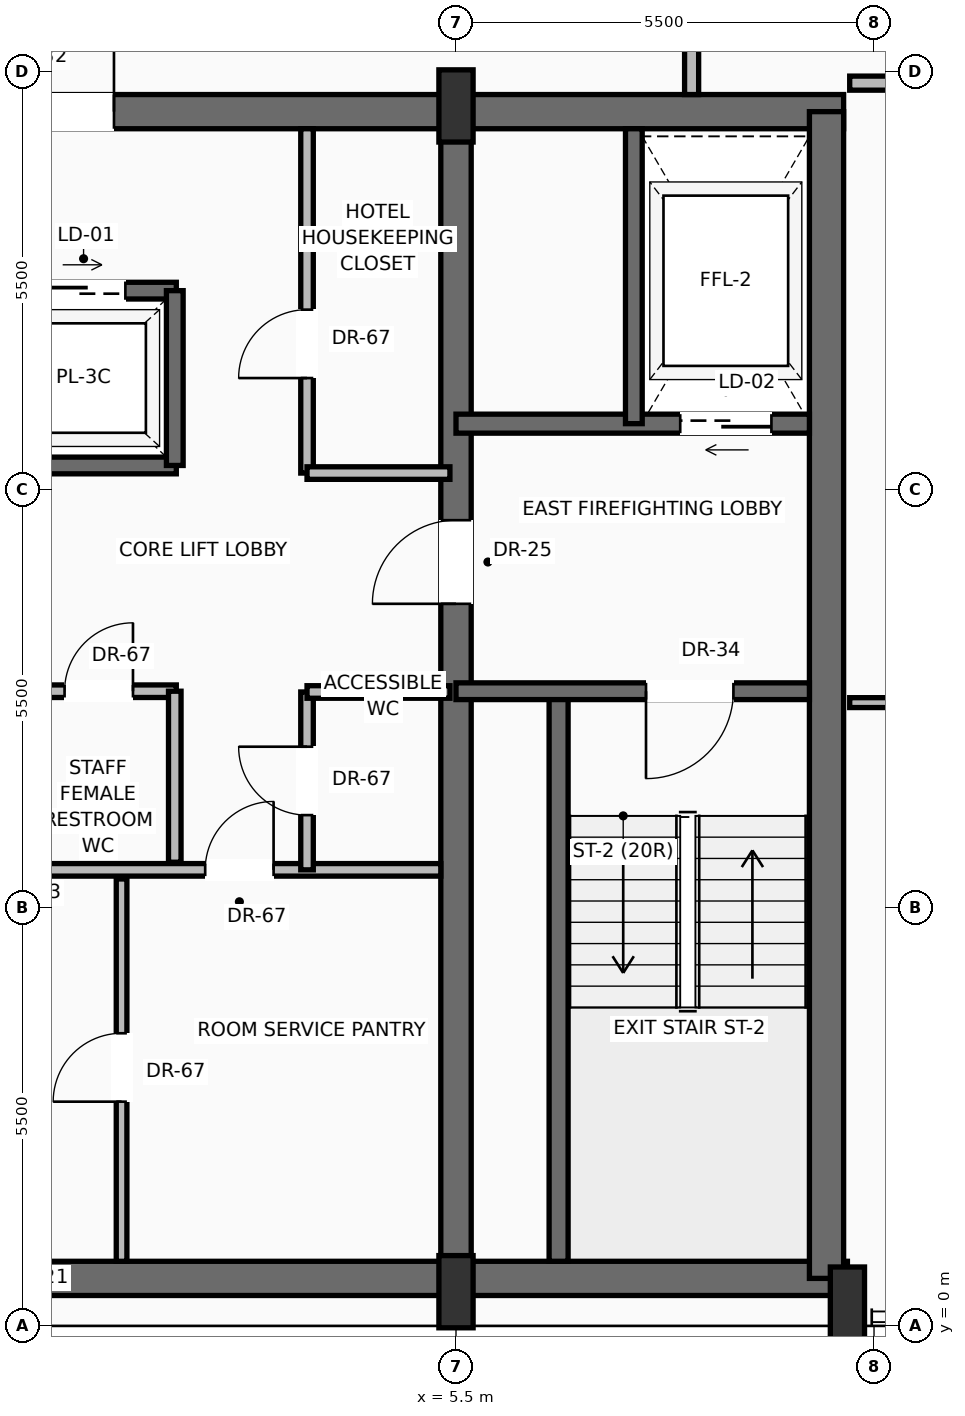
"""IFC4 building model, lengths in metres.
Left out: names, types, materials, properties, quantities, classifications, styles, units other than length and angle.
Written with IfcOpenShell. Run it as: python <this file> out.ifc"""

import sys

from ifc_helpers import new_model, si_unit, direction, frame, frame_2d, origin, origin_2d, place, context, subcontext, project, spatial, rectangle, extrude, source, transform, mapped, element, fill, save


model = new_model("IFC4")
c1 = context("Model", 3, precision=1e-05, world=origin(), true_north=direction((0.0, 1.0)))
c2 = subcontext(c1, "Body", "Model", "MODEL_VIEW")
j1 = project(units=[si_unit("LENGTHUNIT", "METRE"), si_unit("PLANEANGLEUNIT", "RADIAN")], contexts=[c1])
p1 = place(None, origin())
s1 = spatial("IfcSite", under=j1, at=p1, CompositionType="ELEMENT")
p2 = place(p1, origin())
s2 = spatial("IfcBuilding", under=s1, at=p2, CompositionType="ELEMENT")
p3 = place(p2, frame((0.0, 0.0, 279.9)))
s3 = spatial("IfcBuildingStorey", under=s2, at=p3, CompositionType="ELEMENT", Elevation=279.9)
p4 = place(p3, frame((-10.65, 0.625, 0.0), z_axis=(0.0, 0.0, 1.0), x_axis=(1.0, 0.0, 0.0)))
e1 = element("IfcWall", 1, at=p4, inside=s3, PredefinedType="SHEAR", context=c2, shape_type="SweptSolid", body=[
    extrude(rectangle(XDim=21.3, YDim=0.45, at=frame_2d((10.65, 0.0))), origin(), (0.0, 0.0, 1.0), 3.24),
])
p5 = place(p3, frame((-10.6, 15.975, 0.0), z_axis=(0.0, 0.0, 1.0), x_axis=(1.0, 0.0, 0.0)))
e2 = element("IfcWall", 2, at=p5, inside=s3, PredefinedType="SHEAR", context=c2, shape_type="SweptSolid", body=[
    extrude(rectangle(XDim=21.2, YDim=0.45, at=frame_2d((10.6, 0.0))), origin(), (0.0, 0.0, 1.0), 3.24),
])
p6 = place(p5, frame((3.17, 0.0, 0.0)))
e3 = element("IfcOpeningElement", 3, at=p6, cuts=e2, PredefinedType="OPENING", context=c2, shape_type="SweptSolid", body=[
    extrude(rectangle(XDim=1.3, YDim=2.3, at=frame_2d((0.65, 1.15))), frame((0.0, 0.235, 0.0), z_axis=(0.0, -1.0, 0.0), x_axis=(1.0, 0.0, 0.0)), (0.0, 0.0, 1.0), 0.47),
])
p7 = place(p5, frame((9.6, 0.0, 0.0)))
e4 = element("IfcOpeningElement", 4, at=p7, cuts=e2, PredefinedType="OPENING", context=c2, shape_type="SweptSolid", body=[
    extrude(rectangle(XDim=2.0, YDim=2.4, at=frame_2d((1.0, 1.2))), frame((0.0, 0.235, 0.0), z_axis=(0.0, -1.0, 0.0), x_axis=(1.0, 0.0, 0.0)), (0.0, 0.0, 1.0), 0.47),
])
p8 = place(p3, frame((10.375, 0.625, 0.0), z_axis=(0.0, 0.0, 1.0), x_axis=(0.0, 1.0, 0.0)))
e5 = element("IfcWall", 5, at=p8, inside=s3, PredefinedType="SHEAR", context=c2, shape_type="SweptSolid", body=[
    extrude(rectangle(XDim=15.35, YDim=0.45, at=frame_2d((7.675, 0.0))), origin(), (0.0, 0.0, 1.0), 3.24),
])
p9 = place(p3, frame((5.5, 0.625, 0.0), z_axis=(0.0, 0.0, 1.0), x_axis=(0.0, 1.0, 0.0)))
e6 = element("IfcWall", 6, at=p9, inside=s3, PredefinedType="SHEAR", context=c2, shape_type="SweptSolid", body=[
    extrude(rectangle(XDim=15.35, YDim=0.4, at=frame_2d((7.675, 0.0))), origin(), (0.0, 0.0, 1.0), 3.24),
])
p10 = place(p9, frame((8.875, 0.0, 0.0)))
e7 = element("IfcOpeningElement", 7, at=p10, cuts=e6, PredefinedType="OPENING", context=c2, shape_type="SweptSolid", body=[
    extrude(rectangle(XDim=1.1, YDim=2.2, at=frame_2d((0.55, 1.1))), frame((0.0, 0.21, 0.0), z_axis=(0.0, -1.0, 0.0), x_axis=(1.0, 0.0, 0.0)), (0.0, 0.0, 1.0), 0.42),
])
m1 = source(origin(), c2, "Body", "SweptSolid", [
    extrude(rectangle(XDim=0.45, YDim=0.95, at=origin_2d()), origin(), (0.0, 0.0, 1.0), 3.45),
])
for number, where, z_axis, x_axis in (
    (8, (5.5, 0.45, 0.0), (0.0, 0.0, 1.0), (1.0, 0.0, 0.0)),
    (9, (10.65, 0.3, 0.0), (0.0, 0.0, 1.0), (1.0, 0.0, 0.0)),
    (10, (5.5, 16.05, 0.0), (0.0, 0.0, 1.0), (1.0, 0.0, 0.0)),
):
    element("IfcColumn", number, at=place(p3, frame(where, z_axis=z_axis, x_axis=x_axis)), inside=s3, PredefinedType="PILASTER", context=c2, shape_type="MappedRepresentation", body=[
        mapped(m1, transform((0.0, 0.0, 0.0), scale=1.0)),
    ])
p11 = place(p3, frame((7.796, 31.717, 0.0), z_axis=(0.0, 0.0, 1.0), x_axis=(0.507930566701, -0.861398014515, 0.0)))
e11 = element("IfcWall", 11, at=p11, inside=s3, PredefinedType="SOLIDWALL", context=c2, shape_type="SweptSolid", body=[
    extrude(rectangle(XDim=20.045, YDim=0.28, at=frame_2d((10.022, 0.0))), origin(), (0.0, 0.0, 1.0), 2.82),
])
p12 = place(p11, frame((4.811, 0.0, 0.0)))
e12 = element("IfcOpeningElement", 12, at=p12, cuts=e11, PredefinedType="OPENING", context=c2, shape_type="SweptSolid", body=[
    extrude(rectangle(XDim=1.6, YDim=2.35, at=frame_2d((0.8, 1.175))), frame((0.0, 0.15, 0.0), z_axis=(0.0, -1.0, 0.0), x_axis=(1.0, 0.0, 0.0)), (0.0, 0.0, 1.0), 0.3),
])
p13 = place(p11, frame((13.63, 0.0, 0.9)))
e13 = element("IfcOpeningElement", 13, at=p13, cuts=e11, PredefinedType="OPENING", context=c2, shape_type="SweptSolid", body=[
    extrude(rectangle(XDim=1.55, YDim=1.75, at=frame_2d((0.775, 0.875))), frame((0.0, 0.15, 0.0), z_axis=(0.0, -1.0, 0.0), x_axis=(1.0, 0.0, 0.0)), (0.0, 0.0, 1.0), 0.3),
])
p14 = place(p3, frame((6.85, 0.85, 0.0), z_axis=(0.0, 0.0, 1.0), x_axis=(0.0, 1.0, 0.0)))
e14 = element("IfcWall", 14, at=p14, inside=s3, PredefinedType="SOLIDWALL", context=c2, shape_type="SweptSolid", body=[
    extrude(rectangle(XDim=7.5, YDim=0.25, at=frame_2d((3.75, 0.0))), origin(), (0.0, 0.0, 1.0), 3.24),
])
p15 = place(p3, frame((10.15, 8.35, 0.0), z_axis=(0.0, 0.0, 1.0), x_axis=(-1.0, 0.0, 0.0)))
e15 = element("IfcWall", 15, at=p15, inside=s3, PredefinedType="SOLIDWALL", context=c2, shape_type="SweptSolid", body=[
    extrude(rectangle(XDim=4.65, YDim=0.22, at=frame_2d((2.325, 0.0))), origin(), (0.0, 0.0, 1.0), 3.24),
])
p16 = place(p15, frame((1.0, 0.0, 0.0)))
e16 = element("IfcOpeningElement", 16, at=p16, cuts=e15, PredefinedType="OPENING", context=c2, shape_type="SweptSolid", body=[
    extrude(rectangle(XDim=1.15, YDim=2.2, at=frame_2d((0.575, 1.1))), frame((0.0, 0.12, 0.0), z_axis=(0.0, -1.0, 0.0), x_axis=(1.0, 0.0, 0.0)), (0.0, 0.0, 1.0), 0.24),
])
p17 = place(p3, frame((10.15, 11.87, 0.0), z_axis=(0.0, 0.0, 1.0), x_axis=(-1.0, 0.0, 0.0)))
e17 = element("IfcWall", 17, at=p17, inside=s3, PredefinedType="SOLIDWALL", context=c2, shape_type="SweptSolid", body=[
    extrude(rectangle(XDim=4.65, YDim=0.25, at=frame_2d((2.325, 0.0))), origin(), (0.0, 0.0, 1.0), 3.24),
])
p18 = place(p17, frame((0.5, 0.0, 0.0)))
e18 = element("IfcOpeningElement", 18, at=p18, cuts=e17, PredefinedType="OPENING", context=c2, shape_type="SweptSolid", body=[
    extrude(rectangle(XDim=1.2, YDim=2.25, at=frame_2d((0.6, 1.125))), frame((0.0, 0.135, 0.0), z_axis=(0.0, -1.0, 0.0), x_axis=(1.0, 0.0, 0.0)), (0.0, 0.0, 1.0), 0.27),
])
p19 = place(p3, frame((7.84, 11.87, 0.0), z_axis=(0.0, 0.0, 1.0), x_axis=(0.0, 1.0, 0.0)))
e19 = element("IfcWall", 19, at=p19, inside=s3, PredefinedType="SOLIDWALL", context=c2, shape_type="SweptSolid", body=[
    extrude(rectangle(XDim=3.88, YDim=0.22, at=frame_2d((1.94, 0.0))), origin(), (0.0, 0.0, 1.0), 3.24),
])
p20 = place(p3, frame((-5.5, 6.0, 0.0), z_axis=(0.0, 0.0, 1.0), x_axis=(1.0, 0.0, 0.0)))
e20 = element("IfcWall", 20, at=p20, inside=s3, PredefinedType="PARTITIONING", context=c2, shape_type="SweptSolid", body=[
    extrude(rectangle(XDim=10.8, YDim=0.165, at=frame_2d((5.4, 0.0))), origin(), (0.0, 0.0, 1.0), 3.232),
])
p21 = place(p20, frame((7.7, 0.0, 0.0)))
e21 = element("IfcOpeningElement", 21, at=p21, cuts=e20, PredefinedType="OPENING", context=c2, shape_type="SweptSolid", body=[
    extrude(rectangle(XDim=0.9, YDim=2.1, at=frame_2d((0.45, 1.05))), frame((0.0, 0.093, 0.0), z_axis=(0.0, -1.0, 0.0), x_axis=(1.0, 0.0, 0.0)), (0.0, 0.0, 1.0), 0.185),
])
p22 = place(p3, frame((1.1, 0.85, 0.0), z_axis=(0.0, 0.0, 1.0), x_axis=(0.0, 1.0, 0.0)))
e22 = element("IfcWall", 22, at=p22, inside=s3, PredefinedType="PARTITIONING", context=c2, shape_type="SweptSolid", body=[
    extrude(rectangle(XDim=5.03, YDim=0.14, at=frame_2d((2.515, 0.0))), origin(), (0.0, 0.0, 1.0), 3.232),
])
p23 = place(p22, frame((2.1, 0.0, 0.0)))
e23 = element("IfcOpeningElement", 23, at=p23, cuts=e22, PredefinedType="OPENING", context=c2, shape_type="SweptSolid", body=[
    extrude(rectangle(XDim=0.9, YDim=2.1, at=frame_2d((0.45, 1.05))), frame((0.0, 0.08, 0.0), z_axis=(0.0, -1.0, 0.0), x_axis=(1.0, 0.0, 0.0)), (0.0, 0.0, 1.0), 0.16),
])
p24 = place(p3, frame((3.54, 6.0, 0.0), z_axis=(0.0, 0.0, 1.0), x_axis=(0.0, 1.0, 0.0)))
e24 = element("IfcWall", 24, at=p24, inside=s3, PredefinedType="PARTITIONING", context=c2, shape_type="SweptSolid", body=[
    extrude(rectangle(XDim=2.34, YDim=0.165, at=frame_2d((1.17, 0.0))), origin(), (0.0, 0.0, 1.0), 3.232),
])
p25 = place(p24, frame((0.72, 0.0, 0.0)))
e25 = element("IfcOpeningElement", 25, at=p25, cuts=e24, PredefinedType="OPENING", context=c2, shape_type="SweptSolid", body=[
    extrude(rectangle(XDim=0.9, YDim=2.1, at=frame_2d((0.45, 1.05))), frame((0.0, 0.093, 0.0), z_axis=(0.0, -1.0, 0.0), x_axis=(1.0, 0.0, 0.0)), (0.0, 0.0, 1.0), 0.185),
])
p26 = place(p3, frame((3.54, 8.34, 0.0), z_axis=(0.0, 0.0, 1.0), x_axis=(1.0, 0.0, 0.0)))
e26 = element("IfcWall", 26, at=p26, inside=s3, PredefinedType="PARTITIONING", context=c2, shape_type="SweptSolid", body=[
    extrude(rectangle(XDim=1.88, YDim=0.165, at=frame_2d((0.94, 0.0))), origin(), (0.0, 0.0, 1.0), 3.232),
])
p27 = place(p3, frame((-5.3, 8.35, 0.0), z_axis=(0.0, 0.0, 1.0), x_axis=(1.0, 0.0, 0.0)))
e27 = element("IfcWall", 27, at=p27, inside=s3, PredefinedType="PARTITIONING", context=c2, shape_type="SweptSolid", body=[
    extrude(rectangle(XDim=7.12, YDim=0.165, at=frame_2d((3.56, 0.0))), origin(), (0.0, 0.0, 1.0), 3.232),
])
p28 = place(p27, frame((0.85, 0.0, 0.0)))
e28 = element("IfcOpeningElement", 28, at=p28, cuts=e27, PredefinedType="OPENING", context=c2, shape_type="SweptSolid", body=[
    extrude(rectangle(XDim=0.9, YDim=2.1, at=frame_2d((0.45, 1.05))), frame((0.0, 0.093, 0.0), z_axis=(0.0, -1.0, 0.0), x_axis=(1.0, 0.0, 0.0)), (0.0, 0.0, 1.0), 0.185),
])
p29 = place(p27, frame((5.65, 0.0, 0.0)))
e29 = element("IfcOpeningElement", 29, at=p29, cuts=e27, PredefinedType="OPENING", context=c2, shape_type="SweptSolid", body=[
    extrude(rectangle(XDim=0.9, YDim=2.1, at=frame_2d((0.45, 1.05))), frame((0.0, 0.093, 0.0), z_axis=(0.0, -1.0, 0.0), x_axis=(1.0, 0.0, 0.0)), (0.0, 0.0, 1.0), 0.185),
])
p30 = place(p3, frame((1.8, 6.1, 0.0), z_axis=(0.0, 0.0, 1.0), x_axis=(0.0, 1.0, 0.0)))
e30 = element("IfcWall", 30, at=p30, inside=s3, PredefinedType="PARTITIONING", context=c2, shape_type="SweptSolid", body=[
    extrude(rectangle(XDim=2.25, YDim=0.165, at=frame_2d((1.125, 0.0))), origin(), (0.0, 0.0, 1.0), 3.232),
])
p31 = place(p3, frame((-5.5, 11.32, 0.0), z_axis=(0.0, 0.0, 1.0), x_axis=(1.0, 0.0, 0.0)))
e31 = element("IfcWall", 31, at=p31, inside=s3, PredefinedType="SOLIDWALL", context=c2, shape_type="SweptSolid", body=[
    extrude(rectangle(XDim=7.32, YDim=0.22, at=frame_2d((3.66, 0.0))), origin(), (0.0, 0.0, 1.0), 3.24),
])
p32 = place(p3, frame((-5.5, 13.62, 0.0), z_axis=(0.0, 0.0, 1.0), x_axis=(1.0, 0.0, 0.0)))
e32 = element("IfcWall", 32, at=p32, inside=s3, PredefinedType="SOLIDWALL", context=c2, shape_type="SweptSolid", body=[
    extrude(rectangle(XDim=7.32, YDim=0.22, at=frame_2d((3.66, 0.0))), origin(), (0.0, 0.0, 1.0), 3.24),
])
p33 = place(p32, frame((0.75, 0.0, 0.0)))
e33 = element("IfcOpeningElement", 33, at=p33, cuts=e32, PredefinedType="OPENING", context=c2, shape_type="SweptSolid", body=[
    extrude(rectangle(XDim=1.1, YDim=2.2, at=frame_2d((0.55, 1.1))), frame((0.0, 0.12, 0.0), z_axis=(0.0, -1.0, 0.0), x_axis=(1.0, 0.0, 0.0)), (0.0, 0.0, 1.0), 0.24),
])
p34 = place(p32, frame((3.15, 0.0, 0.0)))
e34 = element("IfcOpeningElement", 34, at=p34, cuts=e32, PredefinedType="OPENING", context=c2, shape_type="SweptSolid", body=[
    extrude(rectangle(XDim=1.1, YDim=2.2, at=frame_2d((0.55, 1.1))), frame((0.0, 0.12, 0.0), z_axis=(0.0, -1.0, 0.0), x_axis=(1.0, 0.0, 0.0)), (0.0, 0.0, 1.0), 0.24),
])
p35 = place(p32, frame((5.55, 0.0, 0.0)))
e35 = element("IfcOpeningElement", 35, at=p35, cuts=e32, PredefinedType="OPENING", context=c2, shape_type="SweptSolid", body=[
    extrude(rectangle(XDim=1.1, YDim=2.2, at=frame_2d((0.55, 1.1))), frame((0.0, 0.12, 0.0), z_axis=(0.0, -1.0, 0.0), x_axis=(1.0, 0.0, 0.0)), (0.0, 0.0, 1.0), 0.24),
])
p36 = place(p3, frame((1.8, 11.32, 0.0), z_axis=(0.0, 0.0, 1.0), x_axis=(0.0, 1.0, 0.0)))
e36 = element("IfcWall", 36, at=p36, inside=s3, PredefinedType="SOLIDWALL", context=c2, shape_type="SweptSolid", body=[
    extrude(rectangle(XDim=2.3, YDim=0.22, at=frame_2d((1.15, 0.0))), origin(), (0.0, 0.0, 1.0), 3.24),
])
p37 = place(p3, frame((3.54, 11.22, 0.0), z_axis=(0.0, 0.0, 1.0), x_axis=(0.0, 1.0, 0.0)))
e37 = element("IfcWall", 37, at=p37, inside=s3, PredefinedType="PARTITIONING", context=c2, shape_type="SweptSolid", body=[
    extrude(rectangle(XDim=4.53, YDim=0.165, at=frame_2d((2.265, 0.0))), origin(), (0.0, 0.0, 1.0), 3.232),
])
p38 = place(p37, frame((1.25, 0.0, 0.0)))
e38 = element("IfcOpeningElement", 38, at=p38, cuts=e37, PredefinedType="OPENING", context=c2, shape_type="SweptSolid", body=[
    extrude(rectangle(XDim=0.9, YDim=2.1, at=frame_2d((0.45, 1.05))), frame((0.0, 0.093, 0.0), z_axis=(0.0, -1.0, 0.0), x_axis=(1.0, 0.0, 0.0)), (0.0, 0.0, 1.0), 0.185),
])
p39 = place(p3, frame((3.54, 11.22, 0.0), z_axis=(0.0, 0.0, 1.0), x_axis=(1.0, 0.0, 0.0)))
e39 = element("IfcWall", 39, at=p39, inside=s3, PredefinedType="PARTITIONING", context=c2, shape_type="SweptSolid", body=[
    extrude(rectangle(XDim=1.88, YDim=0.165, at=frame_2d((0.94, 0.0))), origin(), (0.0, 0.0, 1.0), 3.232),
])
p40 = place(p3, frame((8.6, 16.2, 0.0), z_axis=(0.0, 0.0, 1.0), x_axis=(0.0, 1.0, 0.0)))
e40 = element("IfcWall", 40, at=p40, inside=s3, PredefinedType="PARTITIONING", context=c2, shape_type="SweptSolid", body=[
    extrude(rectangle(XDim=12.4, YDim=0.185, at=frame_2d((6.2, 0.0))), origin(), (0.0, 0.0, 1.0), 3.232),
])
p41 = place(p40, frame((3.218, 0.0, 0.0)))
e41 = element("IfcOpeningElement", 41, at=p41, cuts=e40, PredefinedType="OPENING", context=c2, shape_type="SweptSolid", body=[
    extrude(rectangle(XDim=1.05, YDim=2.25, at=frame_2d((0.525, 1.125))), frame((0.0, 0.103, 0.0), z_axis=(0.0, -1.0, 0.0), x_axis=(1.0, 0.0, 0.0)), (0.0, 0.0, 1.0), 0.205),
])
p42 = place(p40, frame((8.936, 0.0, 0.0)))
e42 = element("IfcOpeningElement", 42, at=p42, cuts=e40, PredefinedType="OPENING", context=c2, shape_type="SweptSolid", body=[
    extrude(rectangle(XDim=1.05, YDim=2.25, at=frame_2d((0.525, 1.125))), frame((0.0, 0.103, 0.0), z_axis=(0.0, -1.0, 0.0), x_axis=(1.0, 0.0, 0.0)), (0.0, 0.0, 1.0), 0.205),
])
p43 = place(p3, frame((10.68, 16.35, 0.0), z_axis=(0.0, 0.0, 1.0), x_axis=(1.0, 0.0, 0.0)))
e43 = element("IfcWall", 43, at=p43, inside=s3, PredefinedType="PARTITIONING", context=c2, shape_type="SweptSolid", body=[
    extrude(rectangle(XDim=6.328, YDim=0.185, at=frame_2d((3.164, 0.0))), origin(), (0.0, 0.0, 1.0), 3.232),
])
p44 = place(p43, frame((1.792, 0.0, 0.0)))
e44 = element("IfcOpeningElement", 44, at=p44, cuts=e43, PredefinedType="OPENING", context=c2, shape_type="SweptSolid", body=[
    extrude(rectangle(XDim=1.05, YDim=2.25, at=frame_2d((0.525, 1.125))), frame((0.0, 0.103, 0.0), z_axis=(0.0, -1.0, 0.0), x_axis=(1.0, 0.0, 0.0)), (0.0, 0.0, 1.0), 0.205),
])
p45 = place(p3, frame((10.68, 8.2, 0.0), z_axis=(0.0, 0.0, 1.0), x_axis=(1.0, 0.0, 0.0)))
e45 = element("IfcWall", 45, at=p45, inside=s3, PredefinedType="PARTITIONING", context=c2, shape_type="SweptSolid", body=[
    extrude(rectangle(XDim=11.134, YDim=0.13, at=frame_2d((5.567, 0.0))), origin(), (0.0, 0.0, 1.0), 3.232),
])
p46 = place(p45, frame((4.569, 0.0, 0.0)))
e46 = element("IfcOpeningElement", 46, at=p46, cuts=e45, PredefinedType="OPENING", context=c2, shape_type="SweptSolid", body=[
    extrude(rectangle(XDim=0.95, YDim=2.2, at=frame_2d((0.475, 1.1))), frame((0.0, 0.075, 0.0), z_axis=(0.0, -1.0, 0.0), x_axis=(1.0, 0.0, 0.0)), (0.0, 0.0, 1.0), 0.15),
])
m2 = source(origin(), c2, "Body", "SweptSolid", [
    extrude(rectangle(XDim=1.15, YDim=2.2, at=frame_2d((0.575, 1.1))), frame((0.0, 0.025, 0.0), z_axis=(0.0, -1.0, 0.0), x_axis=(1.0, 0.0, 0.0)), (0.0, 0.0, 1.0), 0.05),
])
p47 = place(p16, origin())
e47 = element("IfcDoor", 47, at=p47, inside=s3, OperationType="SINGLE_SWING_RIGHT", PredefinedType="DOOR", context=c2, shape_type="MappedRepresentation", body=[
    mapped(m2, transform((0.0, 0.0, 0.0), scale=1.0)),
])
fill(e16, e47)
m3 = source(origin(), c2, "Body", "SweptSolid", [
    extrude(rectangle(XDim=1.1, YDim=2.2, at=frame_2d((0.55, 1.1))), frame((0.0, 0.025, 0.0), z_axis=(0.0, -1.0, 0.0), x_axis=(1.0, 0.0, 0.0)), (0.0, 0.0, 1.0), 0.05),
])
p48 = place(p10, origin())
e48 = element("IfcDoor", 48, at=p48, inside=s3, OperationType="SINGLE_SWING_LEFT", PredefinedType="DOOR", context=c2, shape_type="MappedRepresentation", body=[
    mapped(m3, transform((0.0, 0.0, 0.0), scale=1.0)),
])
fill(e7, e48)
m4 = source(origin(), c2, "Body", "SweptSolid", [
    extrude(rectangle(XDim=1.2, YDim=2.25, at=frame_2d((0.6, 1.125))), frame((0.0, 0.025, 0.0), z_axis=(0.0, -1.0, 0.0), x_axis=(1.0, 0.0, 0.0)), (0.0, 0.0, 1.0), 0.05),
])
p49 = place(p18, origin())
e49 = element("IfcDoor", 49, at=p49, inside=s3, OperationType="SLIDING_TO_RIGHT", PredefinedType="DOOR", context=c2, shape_type="MappedRepresentation", body=[
    mapped(m4, transform((0.0, 0.0, 0.0), scale=1.0)),
])
fill(e18, e49)
m5 = source(origin(), c2, "Body", "SweptSolid", [
    extrude(rectangle(XDim=2.0, YDim=2.4, at=frame_2d((1.0, 1.2))), frame((0.0, 0.025, 0.0), z_axis=(0.0, -1.0, 0.0), x_axis=(1.0, 0.0, 0.0)), (0.0, 0.0, 1.0), 0.05),
])
p50 = place(p7, origin())
e50 = element("IfcDoor", 50, at=p50, inside=s3, OperationType="DOUBLE_DOOR_SINGLE_SWING", PredefinedType="DOOR", context=c2, shape_type="MappedRepresentation", body=[
    mapped(m5, transform((0.0, 0.0, 0.0), scale=1.0)),
])
fill(e4, e50)
m6 = source(origin(), c2, "Body", "SweptSolid", [
    extrude(rectangle(XDim=0.9, YDim=2.1, at=frame_2d((0.45, 1.05))), frame((0.0, 0.025, 0.0), z_axis=(0.0, -1.0, 0.0), x_axis=(1.0, 0.0, 0.0)), (0.0, 0.0, 1.0), 0.05),
])
p51 = place(p21, origin())
e51 = element("IfcDoor", 51, at=p51, inside=s3, OperationType="SINGLE_SWING_RIGHT", PredefinedType="DOOR", context=c2, shape_type="MappedRepresentation", body=[
    mapped(m6, transform((0.0, 0.0, 0.0), scale=1.0)),
])
fill(e21, e51)
p52 = place(p23, origin())
e52 = element("IfcDoor", 52, at=p52, inside=s3, OperationType="SINGLE_SWING_LEFT", PredefinedType="DOOR", context=c2, shape_type="MappedRepresentation", body=[
    mapped(m6, transform((0.0, 0.0, 0.0), scale=1.0)),
])
fill(e23, e52)
p53 = place(p25, origin())
e53 = element("IfcDoor", 53, at=p53, inside=s3, OperationType="SINGLE_SWING_RIGHT", PredefinedType="DOOR", context=c2, shape_type="MappedRepresentation", body=[
    mapped(m6, transform((0.0, 0.0, 0.0), scale=1.0)),
])
fill(e25, e53)
p54 = place(p29, origin())
e54 = element("IfcDoor", 54, at=p54, inside=s3, OperationType="SINGLE_SWING_RIGHT", PredefinedType="DOOR", context=c2, shape_type="MappedRepresentation", body=[
    mapped(m6, transform((0.0, 0.0, 0.0), scale=1.0)),
])
fill(e29, e54)
m7 = source(origin(), c2, "Body", "SweptSolid", [
    extrude(rectangle(XDim=1.1, YDim=2.2, at=frame_2d((0.55, 1.1))), frame((0.0, 0.025, 0.0), z_axis=(0.0, -1.0, 0.0), x_axis=(1.0, 0.0, 0.0)), (0.0, 0.0, 1.0), 0.05),
])
p55 = place(p35, origin())
e55 = element("IfcDoor", 55, at=p55, inside=s3, OperationType="SLIDING_TO_RIGHT", PredefinedType="DOOR", context=c2, shape_type="MappedRepresentation", body=[
    mapped(m7, transform((0.0, 0.0, 0.0), scale=1.0)),
])
fill(e35, e55)
p56 = place(p38, origin())
e56 = element("IfcDoor", 56, at=p56, inside=s3, OperationType="SINGLE_SWING_LEFT", PredefinedType="DOOR", context=c2, shape_type="MappedRepresentation", body=[
    mapped(m6, transform((0.0, 0.0, 0.0), scale=1.0)),
])
fill(e38, e56)
save(model, sys.argv[1])
